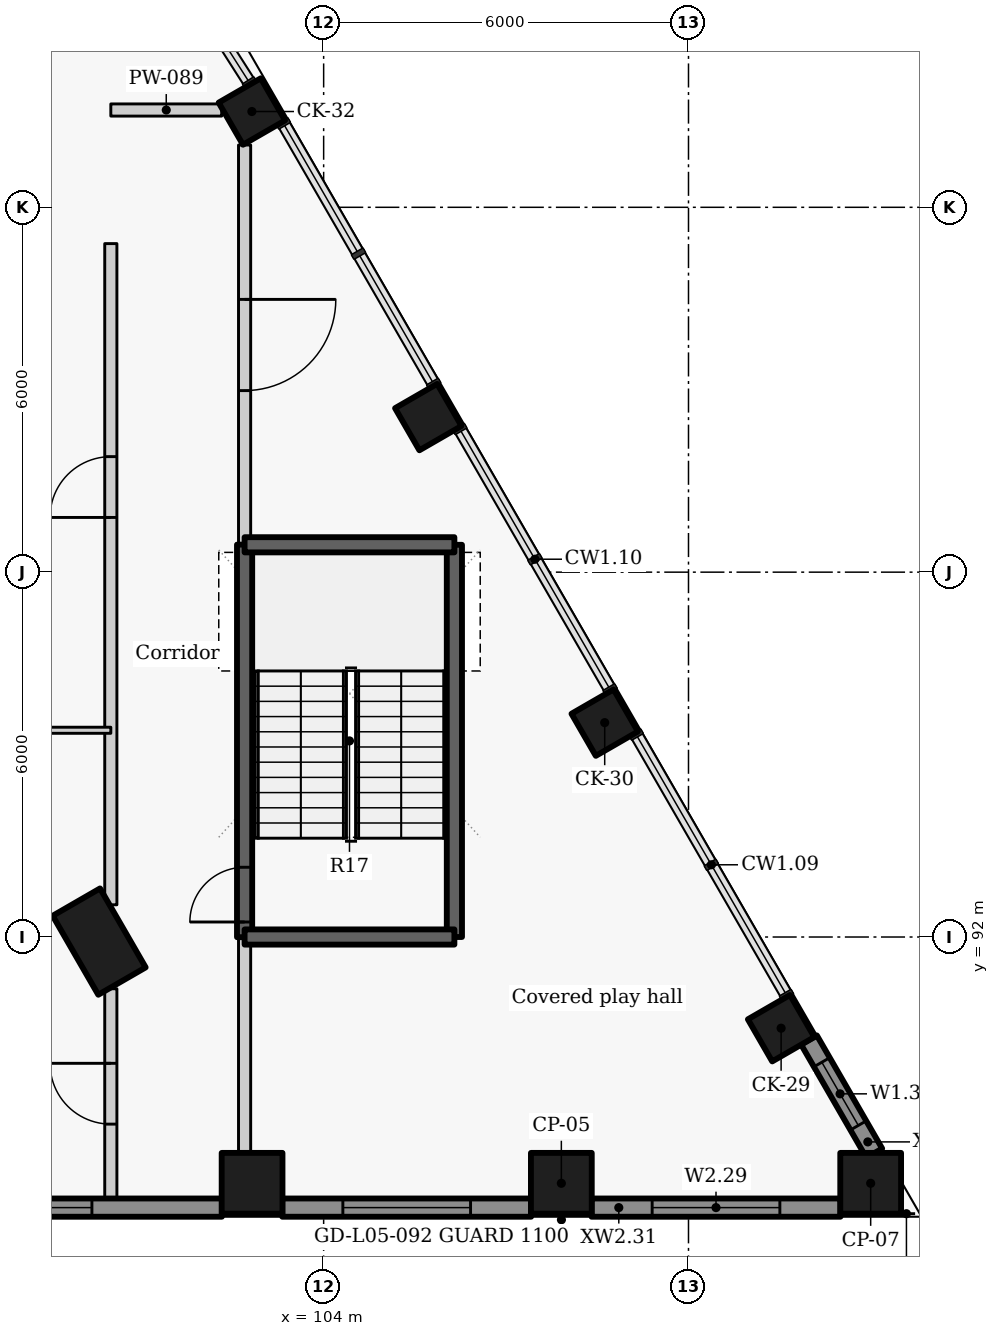
"""IFC4 building model, lengths in metres.
Left out: names, types, materials, properties, quantities, classifications, styles, units other than length and angle.
Written with IfcOpenShell. Run it as: python <this file> out.ifc"""

import sys

from ifc_helpers import new_model, si_unit, direction, frame, frame_2d, origin, origin_2d, place, context, subcontext, project, spatial, rectangle, extrude, element, fill, save


model = new_model("IFC4")
c1 = context("Model", 3, precision=1e-05, world=origin(), true_north=direction((0.0, 1.0)))
c2 = subcontext(c1, "Body", "Model", "MODEL_VIEW")
j1 = project(units=[si_unit("LENGTHUNIT", "METRE"), si_unit("PLANEANGLEUNIT", "RADIAN")], contexts=[c1])
p1 = place(None, origin())
s1 = spatial("IfcSite", under=j1, at=p1, CompositionType="ELEMENT")
p2 = place(p1, origin())
s2 = spatial("IfcBuilding", under=s1, at=p2, CompositionType="ELEMENT")
p3 = place(p2, frame((0.0, 0.0, 24.0)))
s3 = spatial("IfcBuildingStorey", under=s2, at=p3, CompositionType="ELEMENT", Elevation=24.0)
p4 = place(p3, frame((100.308, 91.925, 0.0), z_axis=(0.0, 0.0, 1.0), x_axis=(-0.5, 0.866025403784, 0.0)))
e1 = element("IfcColumn", 1, at=p4, inside=s3, PredefinedType="COLUMN", context=c2, shape_type="SweptSolid", body=[
    extrude(rectangle(XDim=1.5, YDim=0.9, at=origin_2d()), origin(), (0.0, 0.0, 1.0), 4.2),
])
for number, where, z_axis, x_axis in (
    (2, (111.523, 90.5, 0.0), (0.0, 0.0, 1.0), (-0.5, 0.866, 0.0)),
    (3, (108.622, 95.525, 0.0), (0.0, 0.0, 1.0), (-0.5, 0.866, 0.0)),
    (4, (105.721, 100.55, 0.0), (0.0, 0.0, 1.0), (-0.5, 0.866, 0.0)),
    (5, (102.82, 105.575, 0.0), (0.0, 0.0, 1.0), (-0.5, 0.866, 0.0)),
):
    element("IfcColumn", number, at=place(p3, frame(where, z_axis=z_axis, x_axis=x_axis)), inside=s3, PredefinedType="COLUMN", context=c2, shape_type="SweptSolid", body=[
        extrude(rectangle(XDim=0.8, YDim=0.8, at=origin_2d()), origin(), (0.0, 0.0, 1.0), 4.2),
    ])
for number, where, z_axis, x_axis in (
    (6, (102.823, 87.95, 0.0), (0.0, 0.0, 1.0), (1.0, 0.0, 0.0)),
    (7, (107.909, 87.95, 0.0), (0.0, 0.0, 1.0), (1.0, 0.0, 0.0)),
    (8, (112.996, 87.95, 0.0), (0.0, 0.0, 1.0), (1.0, 0.0, 0.0)),
):
    element("IfcColumn", number, at=place(p3, frame(where, z_axis=z_axis, x_axis=x_axis)), inside=s3, PredefinedType="COLUMN", context=c2, shape_type="SweptSolid", body=[
        extrude(rectangle(XDim=1.0, YDim=1.0, at=origin_2d()), origin(), (0.0, 0.0, 1.0), 4.2),
    ])
p5 = place(p3, frame((98.354, 87.55, 0.0), z_axis=(0.0, 0.0, 1.0), x_axis=(1.0, 0.0, 0.0)))
e9 = element("IfcWall", 9, at=p5, inside=s3, PredefinedType="SOLIDWALL", context=c2, shape_type="SweptSolid", body=[
    extrude(rectangle(XDim=3.973, YDim=0.3, at=frame_2d((1.986, 0.0))), origin(), (0.0, 0.0, 1.0), 3.325),
])
p6 = place(p5, frame((0.335, 0.0, 0.9)))
e10 = element("IfcOpeningElement", 10, at=p6, cuts=e9, PredefinedType="OPENING", context=c2, shape_type="SweptSolid", body=[
    extrude(rectangle(XDim=1.5, YDim=2.05, at=frame_2d((0.75, 1.025))), frame((0.0, 0.16, 0.0), z_axis=(0.0, -1.0, 0.0), x_axis=(1.0, 0.0, 0.0)), (0.0, 0.0, 1.0), 0.32),
])
p7 = place(p3, frame((103.319, 87.55, 0.0), z_axis=(0.0, 0.0, 1.0), x_axis=(1.0, 0.0, 0.0)))
e11 = element("IfcWall", 11, at=p7, inside=s3, PredefinedType="SOLIDWALL", context=c2, shape_type="SweptSolid", body=[
    extrude(rectangle(XDim=4.094, YDim=0.3, at=frame_2d((2.047, 0.0))), origin(), (0.0, 0.0, 1.0), 3.325),
])
p8 = place(p7, frame((0.997, 0.0, 0.9)))
e12 = element("IfcOpeningElement", 12, at=p8, cuts=e11, PredefinedType="OPENING", context=c2, shape_type="SweptSolid", body=[
    extrude(rectangle(XDim=2.1, YDim=2.05, at=frame_2d((1.05, 1.025))), frame((0.0, 0.16, 0.0), z_axis=(0.0, -1.0, 0.0), x_axis=(1.0, 0.0, 0.0)), (0.0, 0.0, 1.0), 0.32),
])
p9 = place(p3, frame((108.405, 87.55, 0.0), z_axis=(0.0, 0.0, 1.0), x_axis=(1.0, 0.0, 0.0)))
e13 = element("IfcWall", 13, at=p9, inside=s3, PredefinedType="SOLIDWALL", context=c2, shape_type="SweptSolid", body=[
    extrude(rectangle(XDim=4.095, YDim=0.3, at=frame_2d((2.047, 0.0))), origin(), (0.0, 0.0, 1.0), 3.325),
])
p10 = place(p9, frame((0.998, 0.0, 0.9)))
e14 = element("IfcOpeningElement", 14, at=p10, cuts=e13, PredefinedType="OPENING", context=c2, shape_type="SweptSolid", body=[
    extrude(rectangle(XDim=2.1, YDim=2.05, at=frame_2d((1.05, 1.025))), frame((0.0, 0.16, 0.0), z_axis=(0.0, -1.0, 0.0), x_axis=(1.0, 0.0, 0.0)), (0.0, 0.0, 1.0), 0.32),
])
p11 = place(p3, frame((113.055, 88.447, 0.0), z_axis=(0.0, 0.0, 1.0), x_axis=(-0.499987977232, 0.866032345022, 0.0)))
e15 = element("IfcWall", 15, at=p11, inside=s3, PredefinedType="SOLIDWALL", context=c2, shape_type="SweptSolid", body=[
    extrude(rectangle(XDim=2.149, YDim=0.3, at=frame_2d((1.074, 0.0))), origin(), (0.0, 0.0, 1.0), 3.325),
])
p12 = place(p11, frame((0.525, 0.0, 0.9)))
e16 = element("IfcOpeningElement", 16, at=p12, cuts=e15, PredefinedType="OPENING", context=c2, shape_type="SweptSolid", body=[
    extrude(rectangle(XDim=1.2, YDim=2.05, at=frame_2d((0.6, 1.025))), frame((0.0, 0.16, 0.0), z_axis=(0.0, -1.0, 0.0), x_axis=(1.0, 0.0, 0.0)), (0.0, 0.0, 1.0), 0.32),
])
p13 = place(p3, frame((102.7, 91.997, -0.3), z_axis=(0.0, 0.0, 1.0), x_axis=(0.0, 1.0, 0.0)))
e17 = element("IfcWall", 17, at=p13, inside=s3, PredefinedType="SHEAR", context=c2, shape_type="SweptSolid", body=[
    extrude(rectangle(XDim=6.456, YDim=0.25, at=frame_2d((3.228, 0.0))), origin(), (0.0, 0.0, 1.0), 4.225),
])
p14 = place(p13, frame((0.25, 0.0, 0.3)))
e18 = element("IfcOpeningElement", 18, at=p14, cuts=e17, PredefinedType="OPENING", context=c2, shape_type="SweptSolid", body=[
    extrude(rectangle(XDim=0.9, YDim=2.1, at=frame_2d((0.45, 1.05))), frame((0.0, 0.135, 0.0), z_axis=(0.0, -1.0, 0.0), x_axis=(1.0, 0.0, 0.0)), (0.0, 0.0, 1.0), 0.27),
])
p15 = place(p3, frame((102.7, 88.467, 0.0), z_axis=(0.0, 0.0, 1.0), x_axis=(0.0, 1.0, 0.0)))
e19 = element("IfcWall", 19, at=p15, inside=s3, PredefinedType="PARTITIONING", context=c2, shape_type="SweptSolid", body=[
    extrude(rectangle(XDim=3.536, YDim=0.2, at=frame_2d((1.768, 0.0))), origin(), (0.0, 0.0, 1.0), 3.925),
])
p16 = place(p3, frame((102.7, 105.025, 0.0), z_axis=(0.0, 0.0, 1.0), x_axis=(0.0, -1.0, 0.0)))
e20 = element("IfcWall", 20, at=p16, inside=s3, PredefinedType="PARTITIONING", context=c2, shape_type="SweptSolid", body=[
    extrude(rectangle(XDim=6.578, YDim=0.2, at=frame_2d((3.289, 0.0))), origin(), (0.0, 0.0, 1.0), 3.925),
])
p17 = place(p16, frame((2.539, 0.0, 0.0)))
e21 = element("IfcOpeningElement", 21, at=p17, cuts=e20, PredefinedType="OPENING", context=c2, shape_type="SweptSolid", body=[
    extrude(rectangle(XDim=1.5, YDim=2.1, at=frame_2d((0.75, 1.05))), frame((0.0, 0.11, 0.0), z_axis=(0.0, -1.0, 0.0), x_axis=(1.0, 0.0, 0.0)), (0.0, 0.0, 1.0), 0.22),
])
p18 = place(p3, frame((100.5, 87.7, 0.0), z_axis=(0.0, 0.0, 1.0), x_axis=(0.0, 1.0, 0.0)))
e22 = element("IfcWall", 22, at=p18, inside=s3, PredefinedType="PARTITIONING", context=c2, shape_type="SweptSolid", body=[
    extrude(rectangle(XDim=3.449, YDim=0.2, at=frame_2d((1.725, 0.0))), origin(), (0.0, 0.0, 1.0), 3.405),
])
p19 = place(p18, frame((1.223, 0.0, 0.0)))
e23 = element("IfcOpeningElement", 23, at=p19, cuts=e22, PredefinedType="OPENING", context=c2, shape_type="SweptSolid", body=[
    extrude(rectangle(XDim=1.0, YDim=2.1, at=frame_2d((0.5, 1.05))), frame((0.0, 0.11, 0.0), z_axis=(0.0, -1.0, 0.0), x_axis=(1.0, 0.0, 0.0)), (0.0, 0.0, 1.0), 0.22),
])
p20 = place(p3, frame((100.5, 92.53, 0.0), z_axis=(0.0, 0.0, 1.0), x_axis=(0.0, 1.0, 0.0)))
e24 = element("IfcWall", 24, at=p20, inside=s3, PredefinedType="PARTITIONING", context=c2, shape_type="SweptSolid", body=[
    extrude(rectangle(XDim=10.873, YDim=0.2, at=frame_2d((5.437, 0.0))), origin(), (0.0, 0.0, 1.0), 3.925),
])
p21 = place(p20, frame((6.37, 0.0, 0.0)))
e25 = element("IfcOpeningElement", 25, at=p21, cuts=e24, PredefinedType="OPENING", context=c2, shape_type="SweptSolid", body=[
    extrude(rectangle(XDim=1.0, YDim=2.1, at=frame_2d((0.5, 1.05))), frame((0.0, 0.11, 0.0), z_axis=(0.0, -1.0, 0.0), x_axis=(1.0, 0.0, 0.0)), (0.0, 0.0, 1.0), 0.22),
])
p22 = place(p3, frame((100.5, 105.6, 0.0), z_axis=(0.0, 0.0, 1.0), x_axis=(1.0, 0.0, 0.0)))
e26 = element("IfcWall", 26, at=p22, inside=s3, PredefinedType="PARTITIONING", context=c2, shape_type="SweptSolid", body=[
    extrude(rectangle(XDim=1.823, YDim=0.2, at=frame_2d((0.912, 0.0))), origin(), (0.0, 0.0, 1.0), 3.925),
])
p23 = place(p3, frame((106.15, 92.0, -0.3), z_axis=(0.0, 0.0, 1.0), x_axis=(0.0, 1.0, 0.0)))
e27 = element("IfcWall", 27, at=p23, inside=s3, PredefinedType="SHEAR", context=c2, shape_type="SweptSolid", body=[
    extrude(rectangle(XDim=6.45, YDim=0.25, at=frame_2d((3.225, 0.0))), origin(), (0.0, 0.0, 1.0), 4.225),
])
for number, where, z_axis, x_axis in (
    (28, (102.7, 98.45, -0.3), (0.0, 0.0, 1.0), (1.0, 0.0, 0.0)),
    (29, (102.7, 92.0, -0.3), (0.0, 0.0, 1.0), (1.0, 0.0, 0.0)),
):
    element("IfcWall", number, at=place(p3, frame(where, z_axis=z_axis, x_axis=x_axis)), inside=s3, PredefinedType="SHEAR", context=c2, shape_type="SweptSolid", body=[
        extrude(rectangle(XDim=3.45, YDim=0.25, at=frame_2d((1.725, 0.0))), origin(), (0.0, 0.0, 1.0), 4.225),
    ])
p24 = place(p3, frame((97.68, 95.4, 0.0), z_axis=(0.0, 0.0, 1.0), x_axis=(1.0, 0.0, 0.0)))
e30 = element("IfcWall", 30, at=p24, inside=s3, PredefinedType="PARTITIONING", context=c2, shape_type="SweptSolid", body=[
    extrude(rectangle(XDim=2.82, YDim=0.1, at=frame_2d((1.41, 0.0))), origin(), (0.0, 0.0, 1.0), 3.305),
])
p25 = place(p6, origin())
e31 = element("IfcWindow", 31, at=p25, inside=s3, PartitioningType="SINGLE_PANEL", PredefinedType="WINDOW", context=c2, shape_type="SweptSolid", body=[
    extrude(rectangle(XDim=1.5, YDim=2.05, at=frame_2d((0.75, 1.025))), frame((0.0, 0.03, 0.0), z_axis=(0.0, -1.0, 0.0), x_axis=(1.0, 0.0, 0.0)), (0.0, 0.0, 1.0), 0.06),
])
fill(e10, e31)
p26 = place(p8, origin())
e32 = element("IfcWindow", 32, at=p26, inside=s3, PartitioningType="SINGLE_PANEL", PredefinedType="WINDOW", context=c2, shape_type="SweptSolid", body=[
    extrude(rectangle(XDim=2.1, YDim=2.05, at=frame_2d((1.05, 1.025))), frame((0.0, 0.03, 0.0), z_axis=(0.0, -1.0, 0.0), x_axis=(1.0, 0.0, 0.0)), (0.0, 0.0, 1.0), 0.06),
])
fill(e12, e32)
p27 = place(p10, origin())
e33 = element("IfcWindow", 33, at=p27, inside=s3, PartitioningType="SINGLE_PANEL", PredefinedType="WINDOW", context=c2, shape_type="SweptSolid", body=[
    extrude(rectangle(XDim=2.1, YDim=2.05, at=frame_2d((1.05, 1.025))), frame((0.0, 0.03, 0.0), z_axis=(0.0, -1.0, 0.0), x_axis=(1.0, 0.0, 0.0)), (0.0, 0.0, 1.0), 0.06),
])
fill(e14, e33)
p28 = place(p12, origin())
e34 = element("IfcWindow", 34, at=p28, inside=s3, PartitioningType="SINGLE_PANEL", PredefinedType="WINDOW", context=c2, shape_type="SweptSolid", body=[
    extrude(rectangle(XDim=1.2, YDim=2.05, at=frame_2d((0.6, 1.025))), frame((0.0, 0.03, 0.0), z_axis=(0.0, -1.0, 0.0), x_axis=(1.0, 0.0, 0.0)), (0.0, 0.0, 1.0), 0.06),
])
fill(e16, e34)
p29 = place(p14, origin())
e35 = element("IfcDoor", 35, at=p29, inside=s3, OperationType="SINGLE_SWING_LEFT", PredefinedType="DOOR", context=c2, shape_type="SweptSolid", body=[
    extrude(rectangle(XDim=0.9, YDim=2.1, at=frame_2d((0.45, 1.05))), frame((0.0, 0.025, 0.0), z_axis=(0.0, -1.0, 0.0), x_axis=(1.0, 0.0, 0.0)), (0.0, 0.0, 1.0), 0.05),
])
fill(e18, e35)
p30 = place(p17, origin())
e36 = element("IfcDoor", 36, at=p30, inside=s3, OperationType="DOUBLE_DOOR_SINGLE_SWING", PredefinedType="DOOR", context=c2, shape_type="SweptSolid", body=[
    extrude(rectangle(XDim=1.5, YDim=2.1, at=frame_2d((0.75, 1.05))), frame((0.0, 0.025, 0.0), z_axis=(0.0, -1.0, 0.0), x_axis=(1.0, 0.0, 0.0)), (0.0, 0.0, 1.0), 0.05),
])
fill(e21, e36)
p31 = place(p19, origin())
e37 = element("IfcDoor", 37, at=p31, inside=s3, OperationType="SINGLE_SWING_RIGHT", PredefinedType="DOOR", context=c2, shape_type="SweptSolid", body=[
    extrude(rectangle(XDim=1.0, YDim=2.1, at=frame_2d((0.5, 1.05))), frame((0.0, 0.025, 0.0), z_axis=(0.0, -1.0, 0.0), x_axis=(1.0, 0.0, 0.0)), (0.0, 0.0, 1.0), 0.05),
])
fill(e23, e37)
p32 = place(p21, origin())
e38 = element("IfcDoor", 38, at=p32, inside=s3, OperationType="SINGLE_SWING_LEFT", PredefinedType="DOOR", context=c2, shape_type="SweptSolid", body=[
    extrude(rectangle(XDim=1.0, YDim=2.1, at=frame_2d((0.5, 1.05))), frame((0.0, 0.025, 0.0), z_axis=(0.0, -1.0, 0.0), x_axis=(1.0, 0.0, 0.0)), (0.0, 0.0, 1.0), 0.05),
])
fill(e25, e38)
save(model, sys.argv[1])
